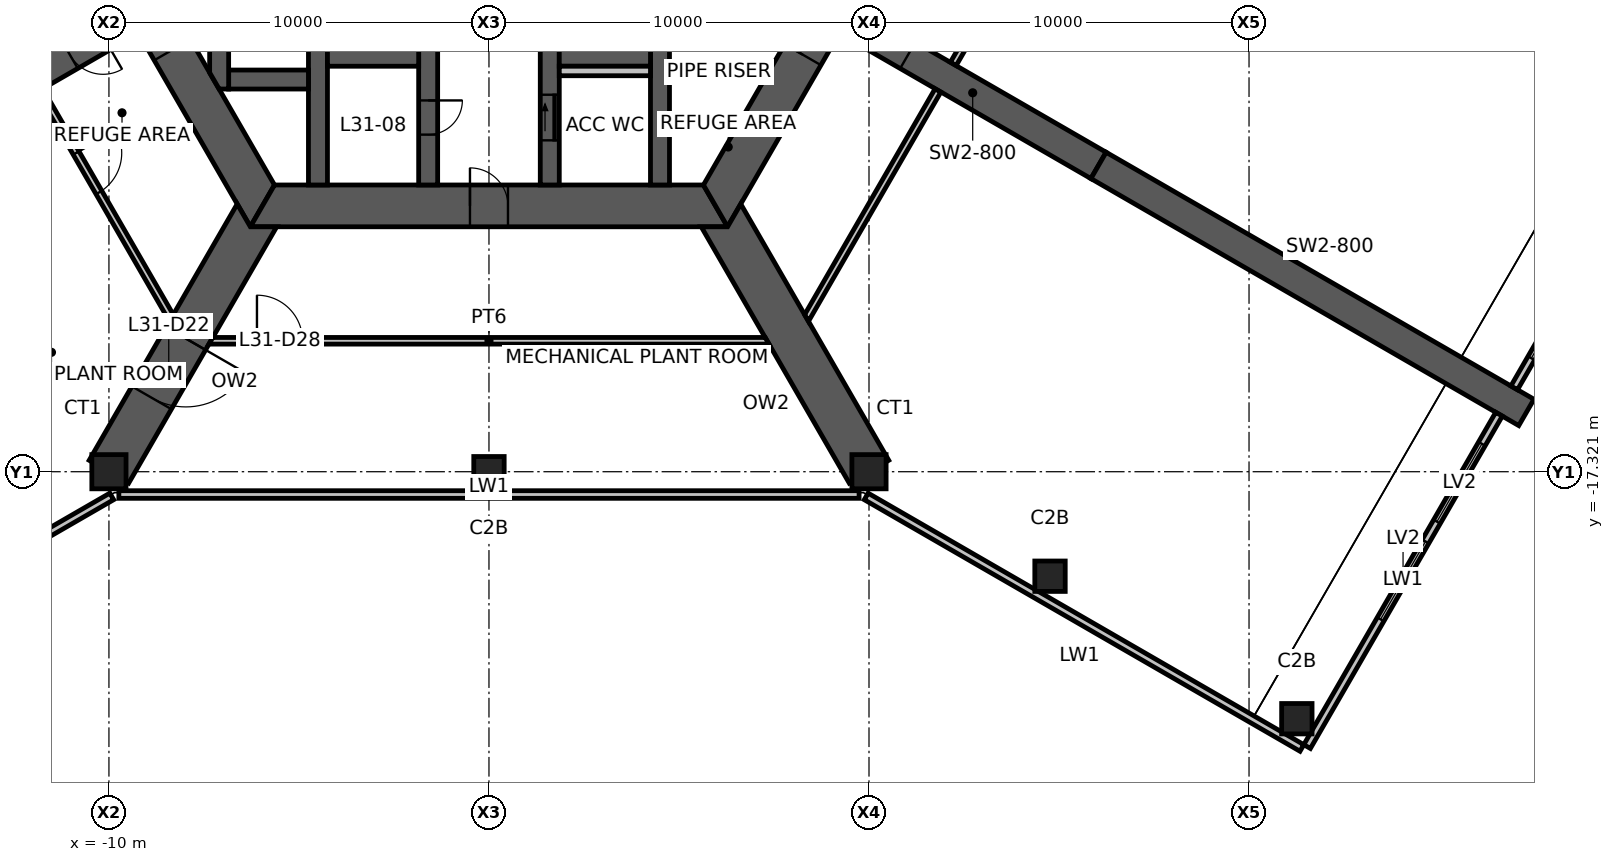
"""IFC4 building model, lengths in metres.
Left out: names, types, materials, properties, quantities, classifications, styles, units other than length and angle.
Written with IfcOpenShell. Run it as: python <this file> out.ifc"""

import sys

from ifc_helpers import new_model, si_unit, direction, frame, frame_2d, origin, origin_2d, place, context, subcontext, project, spatial, polyline, rectangle, hollow_rectangle, outline, extrude, element, fill, save


model = new_model("IFC4")
c1 = context("Model", 3, precision=1e-05, world=origin(), true_north=direction((0.0, 1.0)))
c2 = subcontext(c1, "Body", "Model", "MODEL_VIEW")
j1 = project(units=[si_unit("LENGTHUNIT", "METRE"), si_unit("PLANEANGLEUNIT", "RADIAN")], contexts=[c1])
p1 = place(None, origin())
s1 = spatial("IfcSite", under=j1, at=p1, CompositionType="ELEMENT")
p2 = place(p1, origin())
s2 = spatial("IfcBuilding", under=s1, at=p2, CompositionType="ELEMENT")
p3 = place(p2, frame((0.0, 0.0, 123.6)))
s3 = spatial("IfcBuildingStorey", under=s2, at=p3, CompositionType="ELEMENT", Elevation=123.6)
for number, where, z_axis, x_axis in (
    (1, (-10.0, -17.321, 0.0), (0.0, 0.0, 1.0), (1.0, 0.0, 0.0)),
    (2, (10.0, -17.321, 0.0), (0.0, 0.0, 1.0), (1.0, 0.0, 0.0)),
):
    element("IfcColumn", number, at=place(p3, frame(where, z_axis=z_axis, x_axis=x_axis)), inside=s3, PredefinedType="COLUMN", context=c2, shape_type="SweptSolid", body=[
        extrude(hollow_rectangle(XDim=0.9, YDim=0.9, WallThickness=0.07, at=origin_2d()), origin(), (0.0, 0.0, 1.0), 5.0),
    ])
for number, where, z_axis, x_axis in (
    (3, (0.0, -17.321, 0.0), (0.0, 0.0, 1.0), (1.0, 0.0, 0.0)),
    (4, (14.763, -20.071, 0.0), (0.0, 0.0, 1.0), (1.0, 0.0, 0.0)),
    (5, (21.258, -23.821, 0.0), (0.0, 0.0, 1.0), (1.0, 0.0, 0.0)),
):
    element("IfcColumn", number, at=place(p3, frame(where, z_axis=z_axis, x_axis=x_axis)), inside=s3, PredefinedType="COLUMN", context=c2, shape_type="SweptSolid", body=[
        extrude(hollow_rectangle(XDim=0.8, YDim=0.8, WallThickness=0.045, at=origin_2d()), origin(), (0.0, 0.0, 1.0), 5.0),
    ])
p4 = place(p3, frame((-11.922, 0.0, 0.0), z_axis=(0.0, 0.0, 1.0), x_axis=(0.500004296715, -0.866022923061, 0.0)))
e6 = element("IfcWall", 6, at=p4, inside=s3, PredefinedType="SHEAR", context=c2, shape_type="SweptSolid", body=[
    extrude(outline(polyline([(-0.318, -0.55), (6.381, -0.55), (7.181, -0.55), (12.24, -0.55), (11.605, 0.55), (7.181, 0.55), (6.381, 0.55), (0.318, 0.55), (-0.318, -0.55)])), origin(), (0.0, 0.0, 1.0), 5.0),
])
p5 = place(p4, frame((6.381, 0.0, 0.0)))
e7 = element("IfcOpeningElement", 7, at=p5, cuts=e6, PredefinedType="OPENING", context=c2, shape_type="SweptSolid", body=[
    extrude(rectangle(XDim=0.8, YDim=2.1, at=frame_2d((0.4, 1.05))), frame((0.0, 0.56, 0.0), z_axis=(0.0, -1.0, 0.0), x_axis=(1.0, 0.0, 0.0)), (0.0, 0.0, 1.0), 1.12),
])
p6 = place(p3, frame((-5.961, -10.325, 0.0), z_axis=(0.0, 0.0, 1.0), x_axis=(1.0, 0.0, 0.0)))
e8 = element("IfcWall", 8, at=p6, inside=s3, PredefinedType="SHEAR", context=c2, shape_type="SweptSolid", body=[
    extrude(outline(polyline([(-0.318, -0.55), (5.461, -0.55), (6.461, -0.55), (12.24, -0.55), (11.605, 0.55), (6.461, 0.55), (5.461, 0.55), (0.318, 0.55), (-0.318, -0.55)])), origin(), (0.0, 0.0, 1.0), 5.0),
])
p7 = place(p6, frame((5.461, 0.0, 0.0)))
e9 = element("IfcOpeningElement", 9, at=p7, cuts=e8, PredefinedType="OPENING", context=c2, shape_type="SweptSolid", body=[
    extrude(rectangle(XDim=1.0, YDim=2.1, at=frame_2d((0.5, 1.05))), frame((0.0, 0.56, 0.0), z_axis=(0.0, -1.0, 0.0), x_axis=(1.0, 0.0, 0.0)), (0.0, 0.0, 1.0), 1.12),
])
p8 = place(p3, frame((5.961, -10.325, 0.0), z_axis=(0.0, 0.0, 1.0), x_axis=(0.500004296715, 0.866022923061, 0.0)))
e10 = element("IfcWall", 10, at=p8, inside=s3, PredefinedType="SHEAR", context=c2, shape_type="SweptSolid", body=[
    extrude(outline(polyline([(-0.318, -0.55), (4.594, -0.55), (5.394, -0.55), (12.24, -0.55), (11.605, 0.55), (5.394, 0.55), (4.594, 0.55), (0.318, 0.55), (-0.318, -0.55)])), origin(), (0.0, 0.0, 1.0), 5.0),
])
p9 = place(p8, frame((4.594, 0.0, 0.0)))
e11 = element("IfcOpeningElement", 11, at=p9, cuts=e10, PredefinedType="OPENING", context=c2, shape_type="SweptSolid", body=[
    extrude(rectangle(XDim=0.8, YDim=2.1, at=frame_2d((0.4, 1.05))), frame((0.0, 0.56, 0.0), z_axis=(0.0, -1.0, 0.0), x_axis=(1.0, 0.0, 0.0)), (0.0, 0.0, 1.0), 1.12),
])
p10 = place(p3, frame((-9.418, -5.438, 0.0), z_axis=(0.0, 0.0, 1.0), x_axis=(-0.866029782078, -0.499992416496, 0.0)))
e12 = element("IfcWall", 12, at=p10, inside=s3, PredefinedType="SHEAR", context=c2, shape_type="SweptSolid", body=[
    extrude(rectangle(XDim=7.646, YDim=0.8, at=frame_2d((3.823, 0.0))), origin(), (0.0, 0.0, 1.0), 5.0),
])
p11 = place(p10, frame((0.85, 0.0, 0.0)))
e13 = element("IfcOpeningElement", 13, at=p11, cuts=e12, PredefinedType="OPENING", context=c2, shape_type="SweptSolid", body=[
    extrude(rectangle(XDim=1.0, YDim=2.1, at=frame_2d((0.5, 1.05))), frame((0.0, 0.41, 0.0), z_axis=(0.0, -1.0, 0.0), x_axis=(1.0, 0.0, 0.0)), (0.0, 0.0, 1.0), 0.82),
])
p12 = place(p3, frame((9.418, -5.438, 0.0), z_axis=(0.0, 0.0, 1.0), x_axis=(0.866029782078, -0.499992416496, 0.0)))
e14 = element("IfcWall", 14, at=p12, inside=s3, PredefinedType="SHEAR", context=c2, shape_type="SweptSolid", body=[
    extrude(rectangle(XDim=7.646, YDim=0.8, at=frame_2d((3.823, 0.0))), origin(), (0.0, 0.0, 1.0), 5.0),
])
p13 = place(p12, frame((0.85, 0.0, 0.0)))
e15 = element("IfcOpeningElement", 15, at=p13, cuts=e14, PredefinedType="OPENING", context=c2, shape_type="SweptSolid", body=[
    extrude(rectangle(XDim=1.0, YDim=2.1, at=frame_2d((0.5, 1.05))), frame((0.0, 0.41, 0.0), z_axis=(0.0, -1.0, 0.0), x_axis=(1.0, 0.0, 0.0)), (0.0, 0.0, 1.0), 0.82),
])
p14 = place(p3, frame((16.039, -9.26, 0.0), z_axis=(0.0, 0.0, 1.0), x_axis=(0.866024837091, -0.50000098154, 0.0)))
e16 = element("IfcWall", 16, at=p14, inside=s3, PredefinedType="SHEAR", context=c2, shape_type="SweptSolid", body=[
    extrude(rectangle(XDim=13.0, YDim=0.8, at=frame_2d((6.5, 0.0))), origin(), (0.0, 0.0, 1.0), 5.0),
])
p15 = place(p3, frame((-6.279, -10.875, -1.15), z_axis=(0.0, 0.0, 1.0), x_axis=(-0.50000923905, -0.866020069551, 0.0)))
e17 = element("IfcWall", 17, at=p15, inside=s3, PredefinedType="SHEAR", context=c2, shape_type="SweptSolid", body=[
    extrude(outline(polyline([(-0.346, -0.6), (3.395, -0.6), (5.195, -0.6), (7.443, -0.6), (7.443, 0.6), (5.195, 0.6), (3.395, 0.6), (-0.346, 0.6), (0.0, 0.0), (-0.346, -0.6)])), origin(), (0.0, 0.0, 1.0), 6.15),
])
p16 = place(p15, frame((3.395, 0.0, 1.15)))
e18 = element("IfcOpeningElement", 18, at=p16, cuts=e17, PredefinedType="OPENING", context=c2, shape_type="SweptSolid", body=[
    extrude(rectangle(XDim=1.8, YDim=2.4, at=frame_2d((0.9, 1.2))), frame((0.0, 0.61, 0.0), z_axis=(0.0, -1.0, 0.0), x_axis=(1.0, 0.0, 0.0)), (0.0, 0.0, 1.0), 1.22),
])
p17 = place(p3, frame((6.279, -10.875, -1.15), z_axis=(0.0, 0.0, 1.0), x_axis=(0.50000923905, -0.866020069551, 0.0)))
e19 = element("IfcWall", 19, at=p17, inside=s3, PredefinedType="SHEAR", context=c2, shape_type="SweptSolid", body=[
    extrude(outline(polyline([(-0.346, -0.6), (7.443, -0.6), (7.443, 0.6), (-0.346, 0.6), (0.0, 0.0), (-0.346, -0.6)])), origin(), (0.0, 0.0, 1.0), 6.15),
])
p18 = place(p3, frame((-21.391, -24.59, 0.0), z_axis=(0.0, 0.0, 1.0), x_axis=(0.86602620781, 0.499998607384, 0.0)))
e20 = element("IfcWall", 20, at=p18, inside=s3, PredefinedType="ELEMENTEDWALL", context=c2, shape_type="SweptSolid", body=[
    extrude(rectangle(XDim=13.239, YDim=0.2, at=frame_2d((6.62, 0.0))), origin(), (0.0, 0.0, 1.0), 5.0),
])
p19 = place(p3, frame((-9.739, -17.92, 0.0), z_axis=(0.0, 0.0, 1.0), x_axis=(1.0, 0.0, 0.0)))
e21 = element("IfcWall", 21, at=p19, inside=s3, PredefinedType="ELEMENTEDWALL", context=c2, shape_type="SweptSolid", body=[
    extrude(rectangle(XDim=19.479, YDim=0.2, at=frame_2d((9.739, 0.0))), origin(), (0.0, 0.0, 1.0), 5.0),
])
p20 = place(p3, frame((9.926, -17.97, 0.0), z_axis=(0.0, 0.0, 1.0), x_axis=(0.86602620781, -0.499998607384, 0.0)))
e22 = element("IfcWall", 22, at=p20, inside=s3, PredefinedType="ELEMENTEDWALL", context=c2, shape_type="SweptSolid", body=[
    extrude(rectangle(XDim=13.239, YDim=0.2, at=frame_2d((6.62, 0.0))), origin(), (0.0, 0.0, 1.0), 5.0),
])
p21 = place(p3, frame((21.528, -24.553, 0.0), z_axis=(0.0, 0.0, 1.0), x_axis=(0.500004929441, 0.866022557752, 0.0)))
e23 = element("IfcWall", 23, at=p21, inside=s3, PredefinedType="ELEMENTEDWALL", context=c2, shape_type="SweptSolid", body=[
    extrude(rectangle(XDim=10.1, YDim=0.2, at=frame_2d((5.05, 0.0))), origin(), (0.0, 0.0, 1.0), 5.0),
])
p22 = place(p21, frame((3.867, 0.0, 0.6)))
e24 = element("IfcOpeningElement", 24, at=p22, cuts=e23, PredefinedType="OPENING", context=c2, shape_type="SweptSolid", body=[
    extrude(rectangle(XDim=2.367, YDim=3.6, at=frame_2d((1.183, 1.8))), frame((0.0, 0.11, 0.0), z_axis=(0.0, -1.0, 0.0), x_axis=(1.0, 0.0, 0.0)), (0.0, 0.0, 1.0), 0.22),
])
p23 = place(p21, frame((6.833, 0.0, 0.6)))
e25 = element("IfcOpeningElement", 25, at=p23, cuts=e23, PredefinedType="OPENING", context=c2, shape_type="SweptSolid", body=[
    extrude(rectangle(XDim=2.367, YDim=3.6, at=frame_2d((1.183, 1.8))), frame((0.0, 0.11, 0.0), z_axis=(0.0, -1.0, 0.0), x_axis=(1.0, 0.0, 0.0)), (0.0, 0.0, 1.0), 0.22),
])
p24 = place(p3, frame((26.978, -15.114, 0.0), z_axis=(0.0, 0.0, 1.0), x_axis=(0.499986799974, 0.866033024689, 0.0)))
e26 = element("IfcWall", 26, at=p24, inside=s3, PredefinedType="ELEMENTEDWALL", context=c2, shape_type="SweptSolid", body=[
    extrude(rectangle(XDim=10.1, YDim=0.2, at=frame_2d((5.05, 0.0))), origin(), (0.0, 0.0, 1.0), 5.0),
])
p25 = place(p24, frame((0.9, 0.0, 0.6)))
e27 = element("IfcOpeningElement", 27, at=p25, cuts=e26, PredefinedType="OPENING", context=c2, shape_type="SweptSolid", body=[
    extrude(rectangle(XDim=2.367, YDim=3.6, at=frame_2d((1.183, 1.8))), frame((0.0, 0.11, 0.0), z_axis=(0.0, -1.0, 0.0), x_axis=(1.0, 0.0, 0.0)), (0.0, 0.0, 1.0), 0.22),
])
p26 = place(p24, frame((3.867, 0.0, 0.6)))
e28 = element("IfcOpeningElement", 28, at=p26, cuts=e26, PredefinedType="OPENING", context=c2, shape_type="SweptSolid", body=[
    extrude(rectangle(XDim=2.367, YDim=3.6, at=frame_2d((1.183, 1.8))), frame((0.0, 0.11, 0.0), z_axis=(0.0, -1.0, 0.0), x_axis=(1.0, 0.0, 0.0)), (0.0, 0.0, 1.0), 0.22),
])
p27 = place(p3, frame((31.991, -6.23, 0.0), z_axis=(0.0, 0.0, 1.0), x_axis=(-0.86602620781, 0.499998607384, 0.0)))
e29 = element("IfcWall", 29, at=p27, inside=s3, PredefinedType="ELEMENTEDWALL", context=c2, shape_type="SweptSolid", body=[
    extrude(rectangle(XDim=13.239, YDim=0.2, at=frame_2d((6.62, 0.0))), origin(), (0.0, 0.0, 1.0), 5.0),
])
p28 = place(p3, frame((-1.6, -3.85, 0.0), z_axis=(0.0, 0.0, 1.0), x_axis=(0.0, -1.0, 0.0)))
e30 = element("IfcWall", 30, at=p28, inside=s3, PredefinedType="SHEAR", context=c2, shape_type="SweptSolid", body=[
    extrude(rectangle(XDim=5.925, YDim=0.5, at=frame_2d((2.962, 0.0))), origin(), (0.0, 0.0, 1.0), 5.0),
])
p29 = place(p28, frame((3.7, 0.0, 0.0)))
e31 = element("IfcOpeningElement", 31, at=p29, cuts=e30, PredefinedType="OPENING", context=c2, shape_type="SweptSolid", body=[
    extrude(rectangle(XDim=0.9, YDim=2.1, at=frame_2d((0.45, 1.05))), frame((0.0, 0.26, 0.0), z_axis=(0.0, -1.0, 0.0), x_axis=(1.0, 0.0, 0.0)), (0.0, 0.0, 1.0), 0.52),
])
p30 = place(p3, frame((1.6, -3.85, 0.0), z_axis=(0.0, 0.0, 1.0), x_axis=(0.0, -1.0, 0.0)))
e32 = element("IfcWall", 32, at=p30, inside=s3, PredefinedType="SHEAR", context=c2, shape_type="SweptSolid", body=[
    extrude(rectangle(XDim=5.925, YDim=0.5, at=frame_2d((2.962, 0.0))), origin(), (0.0, 0.0, 1.0), 5.0),
])
p31 = place(p30, frame((3.55, 0.0, 0.0)))
e33 = element("IfcOpeningElement", 33, at=p31, cuts=e32, PredefinedType="OPENING", context=c2, shape_type="SweptSolid", body=[
    extrude(rectangle(XDim=1.2, YDim=2.1, at=frame_2d((0.6, 1.05))), frame((0.0, 0.26, 0.0), z_axis=(0.0, -1.0, 0.0), x_axis=(1.0, 0.0, 0.0)), (0.0, 0.0, 1.0), 0.52),
])
for number, where, z_axis, x_axis in (
    (34, (-4.5, -3.85, 0.0), (0.0, 0.0, 1.0), (0.0, -1.0, 0.0)),
    (35, (4.5, -3.85, 0.0), (0.0, 0.0, 1.0), (0.0, -1.0, 0.0)),
):
    element("IfcWall", number, at=place(p3, frame(where, z_axis=z_axis, x_axis=x_axis)), inside=s3, PredefinedType="SHEAR", context=c2, shape_type="SweptSolid", body=[
        extrude(rectangle(XDim=5.925, YDim=0.5, at=frame_2d((2.962, 0.0))), origin(), (0.0, 0.0, 1.0), 5.0),
    ])
for number, where, z_axis, x_axis in (
    (36, (-4.25, -6.4, 0.0), (0.0, 0.0, 1.0), (1.0, 0.0, 0.0)),
    (37, (1.85, -6.4, 0.0), (0.0, 0.0, 1.0), (1.0, 0.0, 0.0)),
):
    element("IfcWall", number, at=place(p3, frame(where, z_axis=z_axis, x_axis=x_axis)), inside=s3, PredefinedType="SHEAR", context=c2, shape_type="SweptSolid", body=[
        extrude(rectangle(XDim=2.4, YDim=0.5, at=frame_2d((1.2, 0.0))), origin(), (0.0, 0.0, 1.0), 5.0),
    ])
p32 = place(p3, frame((-6.85, -7.0, 0.0), z_axis=(0.0, 0.0, 1.0), x_axis=(1.0, 0.0, 0.0)))
e38 = element("IfcWall", 38, at=p32, inside=s3, PredefinedType="SHEAR", context=c2, shape_type="SweptSolid", body=[
    extrude(rectangle(XDim=2.1, YDim=0.5, at=frame_2d((1.05, 0.0))), origin(), (0.0, 0.0, 1.0), 5.0),
])
p33 = place(p3, frame((-7.1, -3.85, 0.0), z_axis=(0.0, 0.0, 1.0), x_axis=(0.0, -1.0, 0.0)))
e39 = element("IfcWall", 39, at=p33, inside=s3, PredefinedType="SHEAR", context=c2, shape_type="SweptSolid", body=[
    extrude(outline(polyline([(0.0, -0.25), (2.969, -0.25), (3.4, 0.0), (3.4, 0.25), (0.0, 0.25), (0.0, -0.25)])), origin(), (0.0, 0.0, 1.0), 5.0),
])
p34 = place(p3, frame((1.85, -6.775, 0.0), z_axis=(0.0, 0.0, 1.0), x_axis=(1.0, 0.0, 0.0)))
e40 = element("IfcWall", 40, at=p34, inside=s3, PredefinedType="PLUMBINGWALL", context=c2, shape_type="SweptSolid", body=[
    extrude(rectangle(XDim=2.4, YDim=0.25, at=frame_2d((1.2, 0.0))), origin(), (0.0, 0.0, 1.0), 5.0),
])
p35 = place(p3, frame((-11.814, -7.288, 0.0), z_axis=(0.0, 0.0, 1.0), x_axis=(0.500005739714, -0.866022089933, 0.0)))
e41 = element("IfcWall", 41, at=p35, inside=s3, PredefinedType="PARTITIONING", context=c2, shape_type="SweptSolid", body=[
    extrude(outline(polyline([(0.0, -0.087), (1.9, -0.087), (3.1, -0.087), (6.964, -0.087), (6.863, 0.087), (3.1, 0.087), (1.9, 0.087), (0.0, 0.087), (0.0, -0.087)])), origin(), (0.0, 0.0, 1.0), 4.8),
])
p36 = place(p35, frame((1.9, 0.0, 0.0)))
e42 = element("IfcOpeningElement", 42, at=p36, cuts=e41, PredefinedType="OPENING", context=c2, shape_type="SweptSolid", body=[
    extrude(rectangle(XDim=1.2, YDim=2.1, at=frame_2d((0.6, 1.05))), frame((0.0, 0.098, 0.0), z_axis=(0.0, -1.0, 0.0), x_axis=(1.0, 0.0, 0.0)), (0.0, 0.0, 1.0), 0.195),
])
p37 = place(p3, frame((12.219, -6.587, 0.0), z_axis=(0.0, 0.0, 1.0), x_axis=(0.500005739714, 0.866022089933, 0.0)))
e43 = element("IfcWall", 43, at=p37, inside=s3, PredefinedType="PARTITIONING", context=c2, shape_type="SweptSolid", body=[
    extrude(outline(polyline([(0.0, -0.087), (1.9, -0.087), (3.1, -0.087), (6.964, -0.087), (6.863, 0.087), (3.1, 0.087), (1.9, 0.087), (0.0, 0.087), (0.0, -0.087)])), origin(), (0.0, 0.0, 1.0), 4.8),
])
p38 = place(p37, frame((1.9, 0.0, 0.0)))
e44 = element("IfcOpeningElement", 44, at=p38, cuts=e43, PredefinedType="OPENING", context=c2, shape_type="SweptSolid", body=[
    extrude(rectangle(XDim=1.2, YDim=2.1, at=frame_2d((0.6, 1.05))), frame((0.0, 0.098, 0.0), z_axis=(0.0, -1.0, 0.0), x_axis=(1.0, 0.0, 0.0)), (0.0, 0.0, 1.0), 0.195),
])
p39 = place(p3, frame((-7.318, -13.875, 0.0), z_axis=(0.0, 0.0, 1.0), x_axis=(1.0, 0.0, 0.0)))
e45 = element("IfcWall", 45, at=p39, inside=s3, PredefinedType="PARTITIONING", context=c2, shape_type="SweptSolid", body=[
    extrude(outline(polyline([(-0.051, -0.087), (1.213, -0.087), (2.413, -0.087), (14.686, -0.087), (14.585, 0.087), (2.413, 0.087), (1.213, 0.087), (0.051, 0.087), (-0.051, -0.087)])), origin(), (0.0, 0.0, 1.0), 4.8),
])
p40 = place(p39, frame((1.213, 0.0, 0.0)))
e46 = element("IfcOpeningElement", 46, at=p40, cuts=e45, PredefinedType="OPENING", context=c2, shape_type="SweptSolid", body=[
    extrude(rectangle(XDim=1.2, YDim=2.1, at=frame_2d((0.6, 1.05))), frame((0.0, 0.098, 0.0), z_axis=(0.0, -1.0, 0.0), x_axis=(1.0, 0.0, 0.0)), (0.0, 0.0, 1.0), 0.195),
])
p41 = place(p3, frame((8.357, -13.275, 0.0), z_axis=(0.0, 0.0, 1.0), x_axis=(0.500005739714, 0.866022089933, 0.0)))
e47 = element("IfcWall", 47, at=p41, inside=s3, PredefinedType="PARTITIONING", context=c2, shape_type="SweptSolid", body=[
    extrude(outline(polyline([(-0.051, -0.087), (6.913, -0.087), (6.913, 0.087), (0.051, 0.087), (-0.051, -0.087)])), origin(), (0.0, 0.0, 1.0), 4.8),
])
p42 = place(p22, origin())
e48 = element("IfcWindow", 48, at=p42, inside=s3, PartitioningType="SINGLE_PANEL", PredefinedType="USERDEFINED", context=c2, shape_type="SweptSolid", body=[
    extrude(rectangle(XDim=2.367, YDim=3.6, at=frame_2d((1.183, 1.8))), frame((0.0, 0.03, 0.0), z_axis=(0.0, -1.0, 0.0), x_axis=(1.0, 0.0, 0.0)), (0.0, 0.0, 1.0), 0.06),
])
fill(e24, e48)
p43 = place(p23, origin())
e49 = element("IfcWindow", 49, at=p43, inside=s3, PartitioningType="SINGLE_PANEL", PredefinedType="USERDEFINED", context=c2, shape_type="SweptSolid", body=[
    extrude(rectangle(XDim=2.367, YDim=3.6, at=frame_2d((1.183, 1.8))), frame((0.0, 0.03, 0.0), z_axis=(0.0, -1.0, 0.0), x_axis=(1.0, 0.0, 0.0)), (0.0, 0.0, 1.0), 0.06),
])
fill(e25, e49)
p44 = place(p25, origin())
e50 = element("IfcWindow", 50, at=p44, inside=s3, PartitioningType="SINGLE_PANEL", PredefinedType="USERDEFINED", context=c2, shape_type="SweptSolid", body=[
    extrude(rectangle(XDim=2.367, YDim=3.6, at=frame_2d((1.183, 1.8))), frame((0.0, 0.03, 0.0), z_axis=(0.0, -1.0, 0.0), x_axis=(1.0, 0.0, 0.0)), (0.0, 0.0, 1.0), 0.06),
])
fill(e27, e50)
p45 = place(p7, origin())
e51 = element("IfcDoor", 51, at=p45, inside=s3, OperationType="SINGLE_SWING_LEFT", PredefinedType="DOOR", context=c2, shape_type="SweptSolid", body=[
    extrude(rectangle(XDim=1.0, YDim=2.1, at=frame_2d((0.5, 1.05))), frame((0.0, 0.025, 0.0), z_axis=(0.0, -1.0, 0.0), x_axis=(1.0, 0.0, 0.0)), (0.0, 0.0, 1.0), 0.05),
])
fill(e9, e51)
p46 = place(p9, origin())
e52 = element("IfcDoor", 52, at=p46, inside=s3, OperationType="SINGLE_SWING_LEFT", PredefinedType="DOOR", context=c2, shape_type="SweptSolid", body=[
    extrude(rectangle(XDim=0.8, YDim=2.1, at=frame_2d((0.4, 1.05))), frame((0.0, 0.025, 0.0), z_axis=(0.0, -1.0, 0.0), x_axis=(1.0, 0.0, 0.0)), (0.0, 0.0, 1.0), 0.05),
])
fill(e11, e52)
p47 = place(p31, origin())
e53 = element("IfcDoor", 53, at=p47, inside=s3, OperationType="SLIDING_TO_LEFT", PredefinedType="DOOR", context=c2, shape_type="SweptSolid", body=[
    extrude(rectangle(XDim=1.2, YDim=2.1, at=frame_2d((0.6, 1.05))), frame((0.0, 0.025, 0.0), z_axis=(0.0, -1.0, 0.0), x_axis=(1.0, 0.0, 0.0)), (0.0, 0.0, 1.0), 0.05),
])
fill(e33, e53)
p48 = place(p29, origin())
e54 = element("IfcDoor", 54, at=p48, inside=s3, OperationType="SINGLE_SWING_LEFT", PredefinedType="DOOR", context=c2, shape_type="SweptSolid", body=[
    extrude(rectangle(XDim=0.9, YDim=2.1, at=frame_2d((0.45, 1.05))), frame((0.0, 0.025, 0.0), z_axis=(0.0, -1.0, 0.0), x_axis=(1.0, 0.0, 0.0)), (0.0, 0.0, 1.0), 0.05),
])
fill(e31, e54)
p49 = place(p11, origin())
e55 = element("IfcDoor", 55, at=p49, inside=s3, OperationType="SINGLE_SWING_LEFT", PredefinedType="DOOR", context=c2, shape_type="SweptSolid", body=[
    extrude(rectangle(XDim=1.0, YDim=2.1, at=frame_2d((0.5, 1.05))), frame((0.0, 0.025, 0.0), z_axis=(0.0, -1.0, 0.0), x_axis=(1.0, 0.0, 0.0)), (0.0, 0.0, 1.0), 0.05),
])
fill(e13, e55)
p50 = place(p13, origin())
e56 = element("IfcDoor", 56, at=p50, inside=s3, OperationType="SINGLE_SWING_LEFT", PredefinedType="DOOR", context=c2, shape_type="SweptSolid", body=[
    extrude(rectangle(XDim=1.0, YDim=2.1, at=frame_2d((0.5, 1.05))), frame((0.0, 0.025, 0.0), z_axis=(0.0, -1.0, 0.0), x_axis=(1.0, 0.0, 0.0)), (0.0, 0.0, 1.0), 0.05),
])
fill(e15, e56)
p51 = place(p16, origin())
e57 = element("IfcDoor", 57, at=p51, inside=s3, OperationType="DOUBLE_DOOR_SINGLE_SWING", PredefinedType="DOOR", context=c2, shape_type="SweptSolid", body=[
    extrude(rectangle(XDim=1.8, YDim=2.4, at=frame_2d((0.9, 1.2))), frame((0.0, 0.025, 0.0), z_axis=(0.0, -1.0, 0.0), x_axis=(1.0, 0.0, 0.0)), (0.0, 0.0, 1.0), 0.05),
])
fill(e18, e57)
p52 = place(p36, origin())
e58 = element("IfcDoor", 58, at=p52, inside=s3, OperationType="DOUBLE_DOOR_SINGLE_SWING", PredefinedType="DOOR", context=c2, shape_type="SweptSolid", body=[
    extrude(rectangle(XDim=1.2, YDim=2.1, at=frame_2d((0.6, 1.05))), frame((0.0, 0.025, 0.0), z_axis=(0.0, -1.0, 0.0), x_axis=(1.0, 0.0, 0.0)), (0.0, 0.0, 1.0), 0.05),
])
fill(e42, e58)
p53 = place(p40, origin())
e59 = element("IfcDoor", 59, at=p53, inside=s3, OperationType="DOUBLE_DOOR_SINGLE_SWING", PredefinedType="DOOR", context=c2, shape_type="SweptSolid", body=[
    extrude(rectangle(XDim=1.2, YDim=2.1, at=frame_2d((0.6, 1.05))), frame((0.0, 0.025, 0.0), z_axis=(0.0, -1.0, 0.0), x_axis=(1.0, 0.0, 0.0)), (0.0, 0.0, 1.0), 0.05),
])
fill(e46, e59)
save(model, sys.argv[1])
